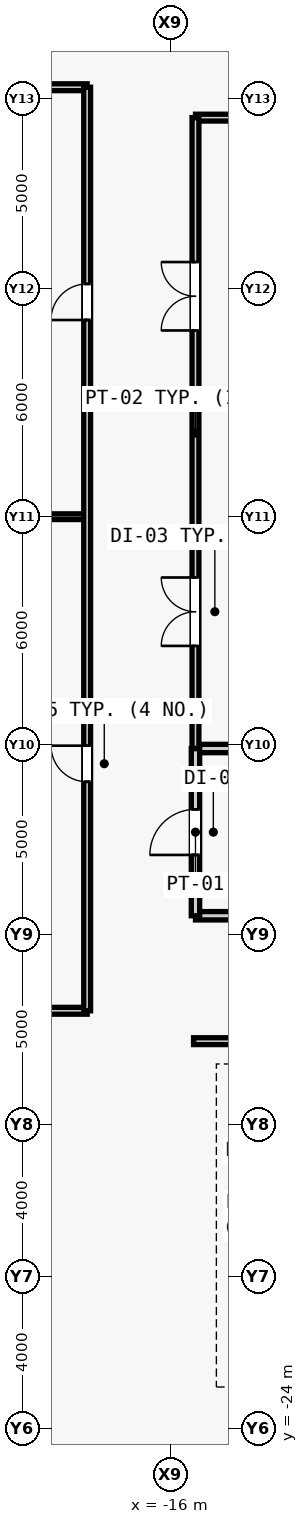
"""IFC4 building model, lengths in metres.
Left out: names, types, materials, properties, quantities, classifications, styles, units other than length and angle.
Written with IfcOpenShell. Run it as: python <this file> out.ifc"""

import sys

from ifc_helpers import new_model, si_unit, direction, frame, frame_2d, origin, place, context, subcontext, project, spatial, rectangle, extrude, source, transform, mapped, element, fill, save


model = new_model("IFC4")
c1 = context("Model", 3, precision=1e-05, world=origin(), true_north=direction((0.0, 1.0)))
c2 = subcontext(c1, "Body", "Model", "MODEL_VIEW")
j1 = project(units=[si_unit("LENGTHUNIT", "METRE"), si_unit("PLANEANGLEUNIT", "RADIAN")], contexts=[c1])
p1 = place(None, origin())
s1 = spatial("IfcSite", under=j1, at=p1, CompositionType="ELEMENT")
p2 = place(p1, origin())
s2 = spatial("IfcBuilding", under=s1, at=p2, CompositionType="ELEMENT")
p3 = place(p2, frame((0.0, 0.0, 6.6)))
s3 = spatial("IfcBuildingStorey", under=s2, at=p3, CompositionType="ELEMENT", Elevation=6.6)
m1 = source(origin(), c2, "Body", "SweptSolid", [
    extrude(rectangle(XDim=4.05, YDim=0.22, at=frame_2d((2.025, 0.0))), origin(), (0.0, 0.0, 1.0), 5.08),
])
for number, where, z_axis, x_axis in (
    (1, (-15.35, -10.5, 0.0), (0.0, 0.0, 1.0), (1.0, 0.0, 0.0)),
    (2, (-15.35, -6.1, 0.0), (0.0, 0.0, 1.0), (1.0, 0.0, 0.0)),
):
    element("IfcWall", number, at=place(p3, frame(where, z_axis=z_axis, x_axis=x_axis)), inside=s3, PredefinedType="PARTITIONING", context=c2, shape_type="MappedRepresentation", body=[
        mapped(m1, transform((0.0, 0.0, 0.0), scale=1.0)),
    ])
m2 = source(origin(), c2, "Body", "SweptSolid", [
    extrude(rectangle(XDim=4.4, YDim=0.22, at=frame_2d((2.2, 0.0))), origin(), (0.0, 0.0, 1.0), 5.08),
])
p4 = place(p3, frame((-15.35, -10.5, 0.0), z_axis=(0.0, 0.0, 1.0), x_axis=(0.0, 1.0, 0.0)))
e3 = element("IfcWall", 3, at=p4, inside=s3, PredefinedType="PARTITIONING", context=c2, shape_type="MappedRepresentation", body=[
    mapped(m2, transform((0.0, 0.0, 0.0), scale=1.0)),
])
m3 = source(origin(), c2, "Body", "SweptSolid", [
    extrude(rectangle(XDim=1.2, YDim=2.2, at=frame_2d((0.6, 1.1))), frame((0.0, 0.12, 0.0), z_axis=(0.0, -1.0, 0.0), x_axis=(1.0, 0.0, 0.0)), (0.0, 0.0, 1.0), 0.24),
])
p5 = place(p4, frame((1.6, 0.0, 0.0)))
e4 = element("IfcOpeningElement", 4, at=p5, cuts=e3, PredefinedType="OPENING", context=c2, shape_type="MappedRepresentation", body=[
    mapped(m3, transform((0.0, 0.0, 0.0), scale=1.0)),
])
m4 = source(origin(), c2, "Body", "SweptSolid", [
    extrude(rectangle(XDim=4.05, YDim=0.18, at=frame_2d((2.025, 0.0))), origin(), (0.0, 0.0, 1.0), 5.08),
])
p6 = place(p3, frame((-15.35, 10.5, 0.0), z_axis=(0.0, 0.0, 1.0), x_axis=(1.0, 0.0, 0.0)))
e5 = element("IfcWall", 5, at=p6, inside=s3, PredefinedType="PARTITIONING", context=c2, shape_type="MappedRepresentation", body=[
    mapped(m4, transform((0.0, 0.0, 0.0), scale=1.0)),
])
m5 = source(origin(), c2, "Body", "SweptSolid", [
    extrude(rectangle(XDim=16.6, YDim=0.18, at=frame_2d((8.3, 0.0))), origin(), (0.0, 0.0, 1.0), 5.08),
])
p7 = place(p3, frame((-15.35, -6.1, 0.0), z_axis=(0.0, 0.0, 1.0), x_axis=(0.0, 1.0, 0.0)))
e6 = element("IfcWall", 6, at=p7, inside=s3, PredefinedType="PARTITIONING", context=c2, shape_type="MappedRepresentation", body=[
    mapped(m5, transform((0.0, 0.0, 0.0), scale=1.0)),
])
m6 = source(origin(), c2, "Body", "SweptSolid", [
    extrude(rectangle(XDim=1.8, YDim=2.25, at=frame_2d((0.9, 1.125))), frame((0.0, 0.1, 0.0), z_axis=(0.0, -1.0, 0.0), x_axis=(1.0, 0.0, 0.0)), (0.0, 0.0, 1.0), 0.2),
])
p8 = place(p7, frame((2.7, 0.0, 0.0)))
e7 = element("IfcOpeningElement", 7, at=p8, cuts=e6, PredefinedType="OPENING", context=c2, shape_type="MappedRepresentation", body=[
    mapped(m6, transform((0.0, 0.0, 0.0), scale=1.0)),
])
p9 = place(p7, frame((11.0, 0.0, 0.0)))
e8 = element("IfcOpeningElement", 8, at=p9, cuts=e6, PredefinedType="OPENING", context=c2, shape_type="MappedRepresentation", body=[
    mapped(m6, transform((0.0, 0.0, 0.0), scale=1.0)),
])
m7 = source(origin(), c2, "Body", "SweptSolid", [
    extrude(rectangle(XDim=30.8, YDim=0.18, at=frame_2d((15.4, 0.0))), origin(), (0.0, 0.0, 1.0), 5.08),
])
p10 = place(p3, frame((-15.4, -13.8, 0.0), z_axis=(0.0, 0.0, 1.0), x_axis=(1.0, 0.0, 0.0)))
e9 = element("IfcWall", 9, at=p10, inside=s3, PredefinedType="PARTITIONING", context=c2, shape_type="MappedRepresentation", body=[
    mapped(m7, transform((0.0, 0.0, 0.0), scale=1.0)),
])
p11 = place(p10, frame((2.7, 0.0, 0.0)))
e10 = element("IfcOpeningElement", 10, at=p11, cuts=e9, PredefinedType="OPENING", context=c2, shape_type="MappedRepresentation", body=[
    mapped(m6, transform((0.0, 0.0, 0.0), scale=1.0)),
])
p12 = place(p10, frame((26.3, 0.0, 0.0)))
e11 = element("IfcOpeningElement", 11, at=p12, cuts=e9, PredefinedType="OPENING", context=c2, shape_type="MappedRepresentation", body=[
    mapped(m6, transform((0.0, 0.0, 0.0), scale=1.0)),
])
m8 = source(origin(), c2, "Body", "SweptSolid", [
    extrude(rectangle(XDim=11.8, YDim=0.18, at=frame_2d((5.9, 0.0))), origin(), (0.0, 0.0, 1.0), 3.28),
])
p13 = place(p3, frame((-30.0, 11.3, 0.0), z_axis=(0.0, 0.0, 1.0), x_axis=(1.0, 0.0, 0.0)))
e12 = element("IfcWall", 12, at=p13, inside=s3, PredefinedType="PARTITIONING", context=c2, shape_type="MappedRepresentation", body=[
    mapped(m8, transform((0.0, 0.0, 0.0), scale=1.0)),
])
m9 = source(origin(), c2, "Body", "SweptSolid", [
    extrude(rectangle(XDim=25.8, YDim=0.18, at=frame_2d((12.9, 0.0))), origin(), (0.0, 0.0, 1.0), 5.08),
])
p14 = place(p3, frame((-44.0, -13.0, 0.0), z_axis=(0.0, 0.0, 1.0), x_axis=(1.0, 0.0, 0.0)))
e13 = element("IfcWall", 13, at=p14, inside=s3, PredefinedType="PARTITIONING", context=c2, shape_type="MappedRepresentation", body=[
    mapped(m9, transform((0.0, 0.0, 0.0), scale=1.0)),
])
m10 = source(origin(), c2, "Body", "SweptSolid", [
    extrude(rectangle(XDim=25.8, YDim=0.15, at=frame_2d((12.9, 0.0))), origin(), (0.0, 0.0, 1.0), 3.28),
])
p15 = place(p3, frame((-44.0, 0.0, 0.0), z_axis=(0.0, 0.0, 1.0), x_axis=(1.0, 0.0, 0.0)))
e14 = element("IfcWall", 14, at=p15, inside=s3, PredefinedType="PARTITIONING", context=c2, shape_type="MappedRepresentation", body=[
    mapped(m10, transform((0.0, 0.0, 0.0), scale=1.0)),
])
m11 = source(origin(), c2, "Body", "SweptSolid", [
    extrude(rectangle(XDim=24.3, YDim=0.18, at=frame_2d((12.15, 0.0))), origin(), (0.0, 0.0, 1.0), 5.08),
])
p16 = place(p3, frame((-18.2, -13.0, 0.0), z_axis=(0.0, 0.0, 1.0), x_axis=(0.0, 1.0, 0.0)))
e15 = element("IfcWall", 15, at=p16, inside=s3, PredefinedType="PARTITIONING", context=c2, shape_type="MappedRepresentation", body=[
    mapped(m11, transform((0.0, 0.0, 0.0), scale=1.0)),
])
m12 = source(origin(), c2, "Body", "SweptSolid", [
    extrude(rectangle(XDim=0.95, YDim=2.15, at=frame_2d((0.475, 1.075))), frame((0.0, 0.1, 0.0), z_axis=(0.0, -1.0, 0.0), x_axis=(1.0, 0.0, 0.0)), (0.0, 0.0, 1.0), 0.2),
])
p17 = place(p16, frame((6.025, 0.0, 0.0)))
e16 = element("IfcOpeningElement", 16, at=p17, cuts=e15, PredefinedType="OPENING", context=c2, shape_type="MappedRepresentation", body=[
    mapped(m12, transform((0.0, 0.0, 0.0), scale=1.0)),
])
p18 = place(p16, frame((18.175, 0.0, 0.0)))
e17 = element("IfcOpeningElement", 17, at=p18, cuts=e15, PredefinedType="OPENING", context=c2, shape_type="MappedRepresentation", body=[
    mapped(m12, transform((0.0, 0.0, 0.0), scale=1.0)),
])
m13 = source(origin(), c2, "Body", "SweptSolid", [
    extrude(rectangle(XDim=1.2, YDim=2.2, at=frame_2d((0.6, 1.1))), frame((0.0, 0.025, 0.0), z_axis=(0.0, -1.0, 0.0), x_axis=(1.0, 0.0, 0.0)), (0.0, 0.0, 1.0), 0.05),
])
p19 = place(p5, origin())
e18 = element("IfcDoor", 18, at=p19, inside=s3, OperationType="SINGLE_SWING_LEFT", PredefinedType="DOOR", context=c2, shape_type="MappedRepresentation", body=[
    mapped(m13, transform((0.0, 0.0, 0.0), scale=1.0)),
])
fill(e4, e18)
m14 = source(origin(), c2, "Body", "SweptSolid", [
    extrude(rectangle(XDim=1.8, YDim=2.25, at=frame_2d((0.9, 1.125))), frame((0.0, 0.025, 0.0), z_axis=(0.0, -1.0, 0.0), x_axis=(1.0, 0.0, 0.0)), (0.0, 0.0, 1.0), 0.05),
])
p20 = place(p8, origin())
e19 = element("IfcDoor", 19, at=p20, inside=s3, OperationType="SINGLE_SWING_LEFT", PredefinedType="DOOR", context=c2, shape_type="MappedRepresentation", body=[
    mapped(m14, transform((0.0, 0.0, 0.0), scale=1.0)),
])
fill(e7, e19)
p21 = place(p9, origin())
e20 = element("IfcDoor", 20, at=p21, inside=s3, OperationType="SINGLE_SWING_RIGHT", PredefinedType="DOOR", context=c2, shape_type="MappedRepresentation", body=[
    mapped(m14, transform((0.0, 0.0, 0.0), scale=1.0)),
])
fill(e8, e20)
m15 = source(origin(), c2, "Body", "SweptSolid", [
    extrude(rectangle(XDim=0.95, YDim=2.15, at=frame_2d((0.475, 1.075))), frame((0.0, 0.025, 0.0), z_axis=(0.0, -1.0, 0.0), x_axis=(1.0, 0.0, 0.0)), (0.0, 0.0, 1.0), 0.05),
])
p22 = place(p17, origin())
e21 = element("IfcDoor", 21, at=p22, inside=s3, OperationType="SINGLE_SWING_RIGHT", PredefinedType="DOOR", context=c2, shape_type="MappedRepresentation", body=[
    mapped(m15, transform((0.0, 0.0, 0.0), scale=1.0)),
])
fill(e16, e21)
p23 = place(p18, origin())
e22 = element("IfcDoor", 22, at=p23, inside=s3, OperationType="SINGLE_SWING_LEFT", PredefinedType="DOOR", context=c2, shape_type="MappedRepresentation", body=[
    mapped(m15, transform((0.0, 0.0, 0.0), scale=1.0)),
])
fill(e17, e22)
save(model, sys.argv[1])
